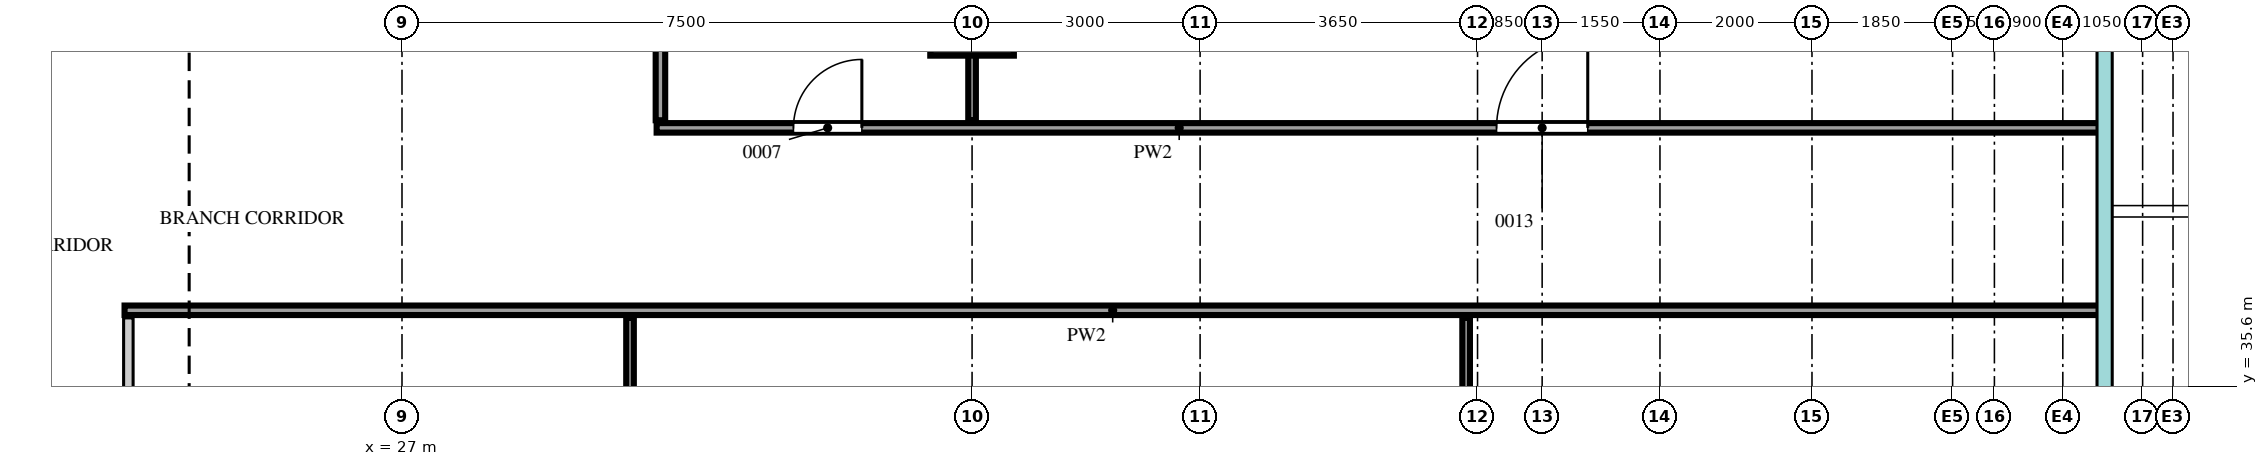
"""IFC4 building model, lengths in metres.
Left out: names, types, materials, properties, quantities, classifications, styles, units other than length and angle.
Written with IfcOpenShell. Run it as: python <this file> out.ifc"""

import sys

from ifc_helpers import new_model, si_unit, direction, frame, frame_2d, origin, origin_2d, place, context, subcontext, project, spatial, rectangle, extrude, source, transform, mapped, element, fill, save


model = new_model("IFC4")
c1 = context("Model", 3, precision=1e-05, world=origin(), true_north=direction((0.0, 1.0)))
c2 = subcontext(c1, "Body", "Model", "MODEL_VIEW")
j1 = project(units=[si_unit("LENGTHUNIT", "METRE"), si_unit("PLANEANGLEUNIT", "RADIAN")], contexts=[c1])
p1 = place(None, origin())
s1 = spatial("IfcSite", under=j1, at=p1, CompositionType="ELEMENT")
p2 = place(p1, origin())
s2 = spatial("IfcBuilding", under=s1, at=p2, CompositionType="ELEMENT")
p3 = place(p2, frame((0.0, 0.0, 226.2)))
s3 = spatial("IfcBuildingStorey", under=s2, at=p3, CompositionType="ELEMENT", Elevation=226.2)
m1 = source(origin(), c2, "Body", "SweptSolid", [
    extrude(rectangle(XDim=1.1, YDim=1.1, at=origin_2d()), origin(), (0.0, 0.0, 1.0), 3.75),
])
p4 = place(p3, frame((34.5, 40.5, 0.0), z_axis=(0.0, 0.0, 1.0), x_axis=(1.0, 0.0, 0.0)))
e1 = element("IfcColumn", 1, at=p4, inside=s3, PredefinedType="COLUMN", context=c2, shape_type="MappedRepresentation", body=[
    mapped(m1, transform((0.0, 0.0, 0.0))),
])
m2 = source(origin(), c2, "Body", "SweptSolid", [
    extrude(rectangle(XDim=18.4, YDim=0.125, at=frame_2d((9.2, 0.0))), origin(), (0.0, 0.0, 1.0), 3.8),
])
p5 = place(p3, frame((23.4, 18.1, 0.0), z_axis=(0.0, 0.0, 1.0), x_axis=(0.0, 1.0, 0.0)))
e2 = element("IfcWall", 2, at=p5, inside=s3, PredefinedType="PARTITIONING", context=c2, shape_type="MappedRepresentation", body=[
    mapped(m2, transform((0.0, 0.0, 0.0))),
])
m3 = source(origin(), c2, "Body", "SweptSolid", [
    extrude(rectangle(XDim=1.2, YDim=2.1, at=frame_2d((0.6, 1.05))), frame((0.0, 0.073, 0.0), z_axis=(0.0, -1.0, 0.0), x_axis=(1.0, 0.0, 0.0)), (0.0, 0.0, 1.0), 0.145),
])
p6 = place(p5, frame((8.6, 0.0, 0.0)))
e3 = element("IfcOpeningElement", 3, at=p6, cuts=e2, PredefinedType="OPENING", context=c2, shape_type="MappedRepresentation", body=[
    mapped(m3, transform((0.0, 0.0, 0.0))),
])
m4 = source(origin(), c2, "Body", "SweptSolid", [
    extrude(rectangle(XDim=18.4, YDim=0.1, at=frame_2d((9.2, 0.0))), origin(), (0.0, 0.0, 1.0), 3.8),
])
for number, where, z_axis, x_axis in (
    (4, (30.0, 18.1, 0.0), (0.0, 0.0, 1.0), (0.0, 1.0, 0.0)),
    (5, (41.0, 18.1, 0.0), (0.0, 0.0, 1.0), (0.0, 1.0, 0.0)),
):
    element("IfcWall", number, at=place(p3, frame(where, z_axis=z_axis, x_axis=x_axis)), inside=s3, PredefinedType="PARTITIONING", context=c2, shape_type="MappedRepresentation", body=[
        mapped(m4, transform((0.0, 0.0, 0.0))),
    ])
m5 = source(origin(), c2, "Body", "SweptSolid", [
    extrude(rectangle(XDim=26.0, YDim=0.125, at=frame_2d((13.0, 0.0))), origin(), (0.0, 0.0, 1.0), 3.8),
])
p7 = place(p3, frame((23.35, 36.6, 0.0), z_axis=(0.0, 0.0, 1.0), x_axis=(1.0, 0.0, 0.0)))
e6 = element("IfcWall", 6, at=p7, inside=s3, PredefinedType="PARTITIONING", context=c2, shape_type="MappedRepresentation", body=[
    mapped(m5, transform((0.0, 0.0, 0.0))),
])
m6 = source(origin(), c2, "Body", "SweptSolid", [
    extrude(rectangle(XDim=19.0, YDim=0.125, at=frame_2d((9.5, 0.0))), origin(), (0.0, 0.0, 1.0), 3.8),
])
p8 = place(p3, frame((30.35, 39.0, 0.0), z_axis=(0.0, 0.0, 1.0), x_axis=(1.0, 0.0, 0.0)))
e7 = element("IfcWall", 7, at=p8, inside=s3, PredefinedType="PARTITIONING", context=c2, shape_type="MappedRepresentation", body=[
    mapped(m6, transform((0.0, 0.0, 0.0))),
])
m7 = source(origin(), c2, "Body", "SweptSolid", [
    extrude(rectangle(XDim=0.9, YDim=2.1, at=frame_2d((0.45, 1.05))), frame((0.0, 0.073, 0.0), z_axis=(0.0, -1.0, 0.0), x_axis=(1.0, 0.0, 0.0)), (0.0, 0.0, 1.0), 0.145),
])
p9 = place(p8, frame((1.8, 0.0, 0.0)))
e8 = element("IfcOpeningElement", 8, at=p9, cuts=e7, PredefinedType="OPENING", context=c2, shape_type="MappedRepresentation", body=[
    mapped(m7, transform((0.0, 0.0, 0.0))),
])
p10 = place(p8, frame((11.05, 0.0, 0.0)))
e9 = element("IfcOpeningElement", 9, at=p10, cuts=e7, PredefinedType="OPENING", context=c2, shape_type="MappedRepresentation", body=[
    mapped(m3, transform((0.0, 0.0, 0.0))),
])
m8 = source(origin(), c2, "Body", "SweptSolid", [
    extrude(rectangle(XDim=10.25, YDim=0.125, at=frame_2d((5.125, 0.0))), origin(), (0.0, 0.0, 1.0), 3.8),
])
p11 = place(p3, frame((30.4, 39.1, 0.0), z_axis=(0.0, 0.0, 1.0), x_axis=(0.0, 1.0, 0.0)))
e10 = element("IfcWall", 10, at=p11, inside=s3, PredefinedType="PARTITIONING", context=c2, shape_type="MappedRepresentation", body=[
    mapped(m8, transform((0.0, 0.0, 0.0))),
])
m9 = source(origin(), c2, "Body", "SweptSolid", [
    extrude(rectangle(XDim=10.25, YDim=0.1, at=frame_2d((5.125, 0.0))), origin(), (0.0, 0.0, 1.0), 3.35),
])
p12 = place(p3, frame((34.5, 39.1, 0.0), z_axis=(0.0, 0.0, 1.0), x_axis=(0.0, 1.0, 0.0)))
e11 = element("IfcWall", 11, at=p12, inside=s3, PredefinedType="PARTITIONING", context=c2, shape_type="MappedRepresentation", body=[
    mapped(m9, transform((0.0, 0.0, 0.0))),
])
m10 = source(origin(), c2, "Body", "SweptSolid", [
    extrude(rectangle(XDim=0.9, YDim=2.1, at=frame_2d((0.45, 1.05))), frame((0.0, 0.025, 0.0), z_axis=(0.0, -1.0, 0.0), x_axis=(1.0, 0.0, 0.0)), (0.0, 0.0, 1.0), 0.05),
])
p13 = place(p9, origin())
e12 = element("IfcDoor", 12, at=p13, inside=s3, OperationType="SINGLE_SWING_LEFT", PredefinedType="DOOR", context=c2, shape_type="MappedRepresentation", body=[
    mapped(m10, transform((0.0, 0.0, 0.0))),
])
fill(e8, e12)
m11 = source(origin(), c2, "Body", "SweptSolid", [
    extrude(rectangle(XDim=1.2, YDim=2.1, at=frame_2d((0.6, 1.05))), frame((0.0, 0.025, 0.0), z_axis=(0.0, -1.0, 0.0), x_axis=(1.0, 0.0, 0.0)), (0.0, 0.0, 1.0), 0.05),
])
p14 = place(p10, origin())
e13 = element("IfcDoor", 13, at=p14, inside=s3, OperationType="SINGLE_SWING_LEFT", PredefinedType="DOOR", context=c2, shape_type="MappedRepresentation", body=[
    mapped(m11, transform((0.0, 0.0, 0.0))),
])
fill(e9, e13)
save(model, sys.argv[1])
